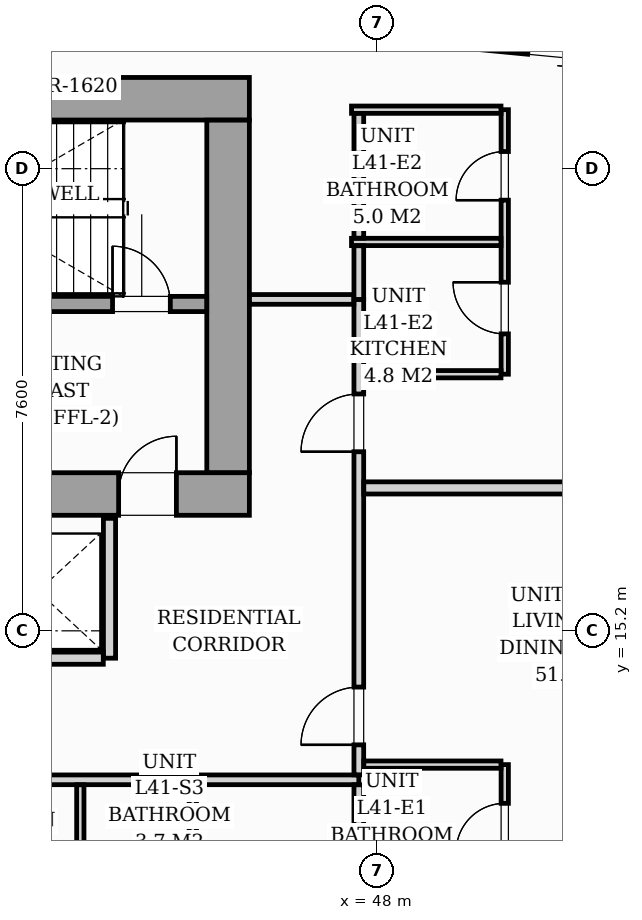
"""IFC4 building model, lengths in metres.
Left out: names, types, materials, properties, quantities, classifications, styles, units other than length and angle.
Written with IfcOpenShell. Run it as: python <this file> out.ifc"""

import sys

from ifc_helpers import new_model, si_unit, direction, frame, frame_2d, origin, origin_2d, place, context, subcontext, project, spatial, rectangle, i_section, extrude, source, transform, mapped, element, fill, save


model = new_model("IFC4")
c1 = context("Model", 3, precision=1e-05, world=origin(), true_north=direction((0.0, 1.0)))
c2 = subcontext(c1, "Body", "Model", "MODEL_VIEW")
j1 = project(units=[si_unit("LENGTHUNIT", "METRE"), si_unit("PLANEANGLEUNIT", "RADIAN")], contexts=[c1])
p1 = place(None, origin())
s1 = spatial("IfcSite", under=j1, at=p1, CompositionType="ELEMENT")
p2 = place(p1, origin())
s2 = spatial("IfcBuilding", under=s1, at=p2, CompositionType="ELEMENT")
p3 = place(p2, frame((0.0, 0.0, 143.8)))
s3 = spatial("IfcBuildingStorey", under=s2, at=p3, CompositionType="ELEMENT", Elevation=143.8)
m1 = source(origin(), c2, "Body", "SweptSolid", [
    extrude(i_section(OverallWidth=0.421, OverallDepth=0.465, WebThickness=0.045, FlangeThickness=0.073, FilletRadius=0.018, at=origin_2d()), origin(), (0.0, 0.0, 1.0), 3.196),
])
for number, where, z_axis, x_axis in (
    (1, (45.6, 17.4, 0.002), (0.0, 0.0, 1.0), (1.0, 0.0, 0.0)),
    (2, (45.6, 24.0, 0.002), (0.0, 0.0, 1.0), (1.0, 0.0, 0.0)),
):
    element("IfcColumn", number, at=place(p3, frame(where, z_axis=z_axis, x_axis=x_axis)), inside=s3, PredefinedType="PILASTER", context=c2, shape_type="MappedRepresentation", body=[
        mapped(m1, transform((0.0, 0.0, 0.0), scale=1.0)),
    ])
p4 = place(p3, frame((40.983, 25.727, 0.0), z_axis=(0.0, 0.0, 1.0), x_axis=(0.995395844771, -0.095849424686, 0.0)))
e3 = element("IfcWall", 3, at=p4, inside=s3, PredefinedType="STANDARD", context=c2, shape_type="SweptSolid", body=[
    extrude(rectangle(XDim=17.01, YDim=0.26, at=frame_2d((8.505, 0.0))), origin(), (0.0, 0.0, 1.0), 2.94),
])
p5 = place(p4, frame((9.55, 0.0, 0.0)))
e4 = element("IfcOpeningElement", 4, at=p5, cuts=e3, PredefinedType="OPENING", context=c2, shape_type="SweptSolid", body=[
    extrude(rectangle(XDim=1.8, YDim=2.06, at=frame_2d((0.9, 1.03))), frame((0.0, 0.14, 0.0), z_axis=(0.0, -1.0, 0.0), x_axis=(1.0, 0.0, 0.0)), (0.0, 0.0, 1.0), 0.28),
])
p6 = place(p4, frame((0.7, 0.0, 0.65)))
e5 = element("IfcOpeningElement", 5, at=p6, cuts=e3, PredefinedType="OPENING", context=c2, shape_type="SweptSolid", body=[
    extrude(rectangle(XDim=1.6, YDim=1.5, at=frame_2d((0.8, 0.75))), frame((0.0, 0.14, 0.0), z_axis=(0.0, -1.0, 0.0), x_axis=(1.0, 0.0, 0.0)), (0.0, 0.0, 1.0), 0.28),
])
p7 = place(p3, frame((26.1, 17.45, 0.0), z_axis=(0.0, 0.0, 1.0), x_axis=(1.0, 0.0, 0.0)))
e6 = element("IfcWall", 6, at=p7, inside=s3, PredefinedType="SHEAR", context=c2, shape_type="SweptSolid", body=[
    extrude(rectangle(XDim=19.8, YDim=0.7, at=frame_2d((9.9, 0.0))), origin(), (0.0, 0.0, 1.0), 3.2),
])
p8 = place(p7, frame((1.05, 0.0, 0.0)))
e7 = element("IfcOpeningElement", 7, at=p8, cuts=e6, PredefinedType="OPENING", context=c2, shape_type="SweptSolid", body=[
    extrude(rectangle(XDim=0.95, YDim=2.06, at=frame_2d((0.475, 1.03))), frame((0.0, 0.36, 0.0), z_axis=(0.0, -1.0, 0.0), x_axis=(1.0, 0.0, 0.0)), (0.0, 0.0, 1.0), 0.72),
])
p9 = place(p7, frame((9.48, 0.0, 0.0)))
e8 = element("IfcOpeningElement", 8, at=p9, cuts=e6, PredefinedType="OPENING", context=c2, shape_type="SweptSolid", body=[
    extrude(rectangle(XDim=0.85, YDim=2.0, at=frame_2d((0.425, 1.0))), frame((0.0, 0.36, 0.0), z_axis=(0.0, -1.0, 0.0), x_axis=(1.0, 0.0, 0.0)), (0.0, 0.0, 1.0), 0.72),
])
p10 = place(p7, frame((17.65, 0.0, 0.0)))
e9 = element("IfcOpeningElement", 9, at=p10, cuts=e6, PredefinedType="OPENING", context=c2, shape_type="SweptSolid", body=[
    extrude(rectangle(XDim=0.95, YDim=2.06, at=frame_2d((0.475, 1.03))), frame((0.0, 0.36, 0.0), z_axis=(0.0, -1.0, 0.0), x_axis=(1.0, 0.0, 0.0)), (0.0, 0.0, 1.0), 0.72),
])
p11 = place(p3, frame((26.1, 23.95, 0.0), z_axis=(0.0, 0.0, 1.0), x_axis=(1.0, 0.0, 0.0)))
e10 = element("IfcWall", 10, at=p11, inside=s3, PredefinedType="SHEAR", context=c2, shape_type="SweptSolid", body=[
    extrude(rectangle(XDim=19.8, YDim=0.7, at=frame_2d((9.9, 0.0))), origin(), (0.0, 0.0, 1.0), 3.2),
])
p12 = place(p3, frame((45.55, 17.802, 0.0), z_axis=(0.0, 0.0, 1.0), x_axis=(0.0, 1.0, 0.0)))
e11 = element("IfcWall", 11, at=p12, inside=s3, PredefinedType="SHEAR", context=c2, shape_type="SweptSolid", body=[
    extrude(rectangle(XDim=5.796, YDim=0.7, at=frame_2d((2.898, 0.0))), origin(), (0.0, 0.0, 1.0), 3.2),
])
p13 = place(p3, frame((37.05, 20.575, 0.0), z_axis=(0.0, 0.0, 1.0), x_axis=(1.0, 0.0, 0.0)))
e12 = element("IfcWall", 12, at=p13, inside=s3, PredefinedType="SOLIDWALL", context=c2, shape_type="SweptSolid", body=[
    extrude(rectangle(XDim=8.148, YDim=0.25, at=frame_2d((4.074, 0.0))), origin(), (0.0, 0.0, 1.0), 3.2),
])
p14 = place(p13, frame((6.6, 0.0, 0.0)))
e13 = element("IfcOpeningElement", 13, at=p14, cuts=e12, PredefinedType="OPENING", context=c2, shape_type="SweptSolid", body=[
    extrude(rectangle(XDim=0.95, YDim=2.06, at=frame_2d((0.475, 1.03))), frame((0.0, 0.135, 0.0), z_axis=(0.0, -1.0, 0.0), x_axis=(1.0, 0.0, 0.0)), (0.0, 0.0, 1.0), 0.27),
])
p15 = place(p3, frame((43.6, 14.75, 0.0), z_axis=(0.0, 0.0, 1.0), x_axis=(0.0, 1.0, 0.0)))
e14 = element("IfcWall", 14, at=p15, inside=s3, PredefinedType="PARTITIONING", context=c2, shape_type="SweptSolid", body=[
    extrude(rectangle(XDim=2.3, YDim=0.2, at=frame_2d((1.15, 0.0))), origin(), (0.0, 0.0, 1.0), 2.94),
])
p16 = place(p3, frame((41.352, 14.75, 0.0), z_axis=(0.0, 0.0, 1.0), x_axis=(1.0, 0.0, 0.0)))
e15 = element("IfcWall", 15, at=p16, inside=s3, PredefinedType="PARTITIONING", context=c2, shape_type="SweptSolid", body=[
    extrude(rectangle(XDim=2.146, YDim=0.2, at=frame_2d((1.073, 0.0))), origin(), (0.0, 0.0, 1.0), 2.94),
])
p17 = place(p3, frame((22.05, 12.75, 0.0), z_axis=(0.0, 0.0, 1.0), x_axis=(1.0, 0.0, 0.0)))
e16 = element("IfcWall", 16, at=p17, inside=s3, PredefinedType="PARTITIONING", context=c2, shape_type="SweptSolid", body=[
    extrude(rectangle(XDim=25.65, YDim=0.16, at=frame_2d((12.825, 0.0))), origin(), (0.0, 0.0, 1.0), 2.94),
])
p18 = place(p17, frame((1.312, 0.0, 0.0)))
e17 = element("IfcOpeningElement", 17, at=p18, cuts=e16, PredefinedType="OPENING", context=c2, shape_type="SweptSolid", body=[
    extrude(rectangle(XDim=0.95, YDim=2.06, at=frame_2d((0.475, 1.03))), frame((0.0, 0.09, 0.0), z_axis=(0.0, -1.0, 0.0), x_axis=(1.0, 0.0, 0.0)), (0.0, 0.0, 1.0), 0.18),
])
p19 = place(p17, frame((8.281, 0.0, 0.0)))
e18 = element("IfcOpeningElement", 18, at=p19, cuts=e16, PredefinedType="OPENING", context=c2, shape_type="SweptSolid", body=[
    extrude(rectangle(XDim=0.95, YDim=2.06, at=frame_2d((0.475, 1.03))), frame((0.0, 0.09, 0.0), z_axis=(0.0, -1.0, 0.0), x_axis=(1.0, 0.0, 0.0)), (0.0, 0.0, 1.0), 0.18),
])
p20 = place(p17, frame((17.268, 0.0, 0.0)))
e19 = element("IfcOpeningElement", 19, at=p20, cuts=e16, PredefinedType="OPENING", context=c2, shape_type="SweptSolid", body=[
    extrude(rectangle(XDim=0.95, YDim=2.06, at=frame_2d((0.475, 1.03))), frame((0.0, 0.09, 0.0), z_axis=(0.0, -1.0, 0.0), x_axis=(1.0, 0.0, 0.0)), (0.0, 0.0, 1.0), 0.18),
])
p21 = place(p3, frame((47.7, 5.783, 0.0), z_axis=(0.0, 0.0, 1.0), x_axis=(0.0, 1.0, 0.0)))
e20 = element("IfcWall", 20, at=p21, inside=s3, PredefinedType="PARTITIONING", context=c2, shape_type="SweptSolid", body=[
    extrude(rectangle(XDim=6.885, YDim=0.16, at=frame_2d((3.442, 0.0))), origin(), (0.0, 0.0, 1.0), 2.94),
])
p22 = place(p3, frame((47.7, 12.832, 0.0), z_axis=(0.0, 0.0, 1.0), x_axis=(0.0, 1.0, 0.0)))
e21 = element("IfcWall", 21, at=p22, inside=s3, PredefinedType="PARTITIONING", context=c2, shape_type="SweptSolid", body=[
    extrude(rectangle(XDim=7.818, YDim=0.16, at=frame_2d((3.909, 0.0))), origin(), (0.0, 0.0, 1.0), 2.94),
])
p23 = place(p22, frame((0.493, 0.0, 0.0)))
e22 = element("IfcOpeningElement", 22, at=p23, cuts=e21, PredefinedType="OPENING", context=c2, shape_type="SweptSolid", body=[
    extrude(rectangle(XDim=0.95, YDim=2.06, at=frame_2d((0.475, 1.03))), frame((0.0, 0.09, 0.0), z_axis=(0.0, -1.0, 0.0), x_axis=(1.0, 0.0, 0.0)), (0.0, 0.0, 1.0), 0.18),
])
p24 = place(p22, frame((5.313, 0.0, 0.0)))
e23 = element("IfcOpeningElement", 23, at=p24, cuts=e21, PredefinedType="OPENING", context=c2, shape_type="SweptSolid", body=[
    extrude(rectangle(XDim=0.95, YDim=2.06, at=frame_2d((0.475, 1.03))), frame((0.0, 0.09, 0.0), z_axis=(0.0, -1.0, 0.0), x_axis=(1.0, 0.0, 0.0)), (0.0, 0.0, 1.0), 0.18),
])
p25 = place(p3, frame((45.902, 20.65, 0.0), z_axis=(0.0, 0.0, 1.0), x_axis=(1.0, 0.0, 0.0)))
e24 = element("IfcWall", 24, at=p25, inside=s3, PredefinedType="PARTITIONING", context=c2, shape_type="SweptSolid", body=[
    extrude(rectangle(XDim=1.716, YDim=0.16, at=frame_2d((0.858, 0.0))), origin(), (0.0, 0.0, 1.0), 2.94),
])
p26 = place(p3, frame((44.97, 6.046, 0.0), z_axis=(0.0, 0.0, 1.0), x_axis=(0.0, 1.0, 0.0)))
e25 = element("IfcWall", 25, at=p26, inside=s3, PredefinedType="PARTITIONING", context=c2, shape_type="SweptSolid", body=[
    extrude(rectangle(XDim=6.622, YDim=0.12, at=frame_2d((3.311, 0.0))), origin(), (0.0, 0.0, 1.0), 2.94),
])
p27 = place(p26, frame((3.354, 0.0, 0.0)))
e26 = element("IfcOpeningElement", 26, at=p27, cuts=e25, PredefinedType="OPENING", context=c2, shape_type="SweptSolid", body=[
    extrude(rectangle(XDim=0.9, YDim=2.05, at=frame_2d((0.45, 1.025))), frame((0.0, 0.07, 0.0), z_axis=(0.0, -1.0, 0.0), x_axis=(1.0, 0.0, 0.0)), (0.0, 0.0, 1.0), 0.14),
])
p28 = place(p3, frame((43.12, 10.562, 0.0), z_axis=(0.0, 0.0, 1.0), x_axis=(0.0, 1.0, 0.0)))
e27 = element("IfcWall", 27, at=p28, inside=s3, PredefinedType="PARTITIONING", context=c2, shape_type="SweptSolid", body=[
    extrude(rectangle(XDim=2.106, YDim=0.12, at=frame_2d((1.053, 0.0))), origin(), (0.0, 0.0, 1.0), 2.94),
])
p29 = place(p3, frame((47.782, 17.55, 0.0), z_axis=(0.0, 0.0, 1.0), x_axis=(1.0, 0.0, 0.0)))
e28 = element("IfcWall", 28, at=p29, inside=s3, PredefinedType="PARTITIONING", context=c2, shape_type="SweptSolid", body=[
    extrude(rectangle(XDim=11.934, YDim=0.2, at=frame_2d((5.967, 0.0))), origin(), (0.0, 0.0, 1.0), 2.94),
])
p30 = place(p3, frame((50.1, 8.85, 0.0), z_axis=(0.0, 0.0, 1.0), x_axis=(0.0, 1.0, 0.0)))
e29 = element("IfcWall", 29, at=p30, inside=s3, PredefinedType="PARTITIONING", context=c2, shape_type="SweptSolid", body=[
    extrude(rectangle(XDim=4.15, YDim=0.12, at=frame_2d((2.075, 0.0))), origin(), (0.0, 0.0, 1.0), 2.94),
])
p31 = place(p30, frame((0.612, 0.0, 0.0)))
e30 = element("IfcOpeningElement", 30, at=p31, cuts=e29, PredefinedType="OPENING", context=c2, shape_type="SweptSolid", body=[
    extrude(rectangle(XDim=0.85, YDim=2.05, at=frame_2d((0.425, 1.025))), frame((0.0, 0.07, 0.0), z_axis=(0.0, -1.0, 0.0), x_axis=(1.0, 0.0, 0.0)), (0.0, 0.0, 1.0), 0.14),
])
p32 = place(p30, frame((2.713, 0.0, 0.0)))
e31 = element("IfcOpeningElement", 31, at=p32, cuts=e29, PredefinedType="OPENING", context=c2, shape_type="SweptSolid", body=[
    extrude(rectangle(XDim=0.8, YDim=2.02, at=frame_2d((0.4, 1.01))), frame((0.0, 0.07, 0.0), z_axis=(0.0, -1.0, 0.0), x_axis=(1.0, 0.0, 0.0)), (0.0, 0.0, 1.0), 0.14),
])
p33 = place(p3, frame((47.782, 13.0, 0.0), z_axis=(0.0, 0.0, 1.0), x_axis=(1.0, 0.0, 0.0)))
e32 = element("IfcWall", 32, at=p33, inside=s3, PredefinedType="PARTITIONING", context=c2, shape_type="SweptSolid", body=[
    extrude(rectangle(XDim=2.256, YDim=0.12, at=frame_2d((1.128, 0.0))), origin(), (0.0, 0.0, 1.0), 2.94),
])
p34 = place(p3, frame((50.1, 19.42, 0.0), z_axis=(0.0, 0.0, 1.0), x_axis=(0.0, 1.0, 0.0)))
e33 = element("IfcWall", 33, at=p34, inside=s3, PredefinedType="PARTITIONING", context=c2, shape_type="SweptSolid", body=[
    extrude(rectangle(XDim=4.35, YDim=0.12, at=frame_2d((2.175, 0.0))), origin(), (0.0, 0.0, 1.0), 2.94),
])
p35 = place(p34, frame((0.663, 0.0, 0.0)))
e34 = element("IfcOpeningElement", 34, at=p35, cuts=e33, PredefinedType="OPENING", context=c2, shape_type="SweptSolid", body=[
    extrude(rectangle(XDim=0.85, YDim=2.05, at=frame_2d((0.425, 1.025))), frame((0.0, 0.07, 0.0), z_axis=(0.0, -1.0, 0.0), x_axis=(1.0, 0.0, 0.0)), (0.0, 0.0, 1.0), 0.14),
])
p36 = place(p34, frame((2.862, 0.0, 0.0)))
e35 = element("IfcOpeningElement", 35, at=p36, cuts=e33, PredefinedType="OPENING", context=c2, shape_type="SweptSolid", body=[
    extrude(rectangle(XDim=0.8, YDim=2.02, at=frame_2d((0.4, 1.01))), frame((0.0, 0.07, 0.0), z_axis=(0.0, -1.0, 0.0), x_axis=(1.0, 0.0, 0.0)), (0.0, 0.0, 1.0), 0.14),
])
p37 = place(p3, frame((47.58, 21.595, 0.0), z_axis=(0.0, 0.0, 1.0), x_axis=(1.0, 0.0, 0.0)))
e36 = element("IfcWall", 36, at=p37, inside=s3, PredefinedType="PARTITIONING", context=c2, shape_type="SweptSolid", body=[
    extrude(rectangle(XDim=2.458, YDim=0.12, at=frame_2d((1.229, 0.0))), origin(), (0.0, 0.0, 1.0), 2.94),
])
p38 = place(p3, frame((47.782, 19.42, 0.0), z_axis=(0.0, 0.0, 1.0), x_axis=(1.0, 0.0, 0.0)))
e37 = element("IfcWall", 37, at=p38, inside=s3, PredefinedType="PARTITIONING", context=c2, shape_type="SweptSolid", body=[
    extrude(rectangle(XDim=2.256, YDim=0.12, at=frame_2d((1.128, 0.0))), origin(), (0.0, 0.0, 1.0), 2.94),
])
p39 = place(p3, frame((47.58, 23.77, 0.0), z_axis=(0.0, 0.0, 1.0), x_axis=(1.0, 0.0, 0.0)))
e38 = element("IfcWall", 38, at=p39, inside=s3, PredefinedType="PARTITIONING", context=c2, shape_type="SweptSolid", body=[
    extrude(rectangle(XDim=2.458, YDim=0.12, at=frame_2d((1.229, 0.0))), origin(), (0.0, 0.0, 1.0), 2.216),
])
p40 = place(p3, frame((47.7, 20.65, 0.0), z_axis=(0.0, 0.0, 1.0), x_axis=(0.0, 1.0, 0.0)))
e39 = element("IfcWall", 39, at=p40, inside=s3, PredefinedType="PARTITIONING", context=c2, shape_type="SweptSolid", body=[
    extrude(rectangle(XDim=0.883, YDim=0.16, at=frame_2d((0.441, 0.0))), origin(), (0.0, 0.0, 1.0), 2.94),
])
p41 = place(p3, frame((47.7, 21.657, 0.0), z_axis=(0.0, 0.0, 1.0), x_axis=(0.0, 1.0, 0.0)))
e40 = element("IfcWall", 40, at=p41, inside=s3, PredefinedType="PARTITIONING", context=c2, shape_type="SweptSolid", body=[
    extrude(rectangle(XDim=2.051, YDim=0.16, at=frame_2d((1.025, 0.0))), origin(), (0.0, 0.0, 1.0), 2.94),
])
m2 = source(origin(), c2, "Body", "SweptSolid", [
    extrude(rectangle(XDim=1.8, YDim=2.06, at=frame_2d((0.9, 1.03))), frame((0.0, 0.025, 0.0), z_axis=(0.0, -1.0, 0.0), x_axis=(1.0, 0.0, 0.0)), (0.0, 0.0, 1.0), 0.05),
])
p42 = place(p5, origin())
e41 = element("IfcDoor", 41, at=p42, inside=s3, OperationType="SLIDING_TO_RIGHT", PredefinedType="DOOR", context=c2, shape_type="MappedRepresentation", body=[
    mapped(m2, transform((0.0, 0.0, 0.0), scale=1.0)),
])
fill(e4, e41)
m3 = source(origin(), c2, "Body", "SweptSolid", [
    extrude(rectangle(XDim=0.95, YDim=2.06, at=frame_2d((0.475, 1.03))), frame((0.0, 0.025, 0.0), z_axis=(0.0, -1.0, 0.0), x_axis=(1.0, 0.0, 0.0)), (0.0, 0.0, 1.0), 0.05),
])
p43 = place(p10, origin())
e42 = element("IfcDoor", 42, at=p43, inside=s3, OperationType="SINGLE_SWING_RIGHT", PredefinedType="DOOR", context=c2, shape_type="MappedRepresentation", body=[
    mapped(m3, transform((0.0, 0.0, 0.0), scale=1.0)),
])
fill(e9, e42)
p44 = place(p14, origin())
e43 = element("IfcDoor", 43, at=p44, inside=s3, OperationType="SINGLE_SWING_LEFT", PredefinedType="DOOR", context=c2, shape_type="MappedRepresentation", body=[
    mapped(m3, transform((0.0, 0.0, 0.0), scale=1.0)),
])
fill(e13, e43)
m4 = source(origin(), c2, "Body", "SweptSolid", [
    extrude(rectangle(XDim=0.95, YDim=2.06, at=frame_2d((0.475, 1.03))), frame((0.0, 0.025, 0.0), z_axis=(0.0, -1.0, 0.0), x_axis=(1.0, 0.0, 0.0)), (0.0, 0.0, 1.0), 0.05),
])
p45 = place(p23, origin())
e44 = element("IfcDoor", 44, at=p45, inside=s3, OperationType="SINGLE_SWING_LEFT", PredefinedType="DOOR", context=c2, shape_type="MappedRepresentation", body=[
    mapped(m4, transform((0.0, 0.0, 0.0), scale=1.0)),
])
fill(e22, e44)
m5 = source(origin(), c2, "Body", "SweptSolid", [
    extrude(rectangle(XDim=0.8, YDim=2.02, at=frame_2d((0.4, 1.01))), frame((0.0, 0.025, 0.0), z_axis=(0.0, -1.0, 0.0), x_axis=(1.0, 0.0, 0.0)), (0.0, 0.0, 1.0), 0.05),
])
p46 = place(p32, origin())
e45 = element("IfcDoor", 45, at=p46, inside=s3, OperationType="SINGLE_SWING_LEFT", PredefinedType="DOOR", context=c2, shape_type="MappedRepresentation", body=[
    mapped(m5, transform((0.0, 0.0, 0.0), scale=1.0)),
])
fill(e31, e45)
p47 = place(p24, origin())
e46 = element("IfcDoor", 46, at=p47, inside=s3, OperationType="SINGLE_SWING_LEFT", PredefinedType="DOOR", context=c2, shape_type="MappedRepresentation", body=[
    mapped(m4, transform((0.0, 0.0, 0.0), scale=1.0)),
])
fill(e23, e46)
m6 = source(origin(), c2, "Body", "SweptSolid", [
    extrude(rectangle(XDim=0.85, YDim=2.05, at=frame_2d((0.425, 1.025))), frame((0.0, 0.025, 0.0), z_axis=(0.0, -1.0, 0.0), x_axis=(1.0, 0.0, 0.0)), (0.0, 0.0, 1.0), 0.05),
])
p48 = place(p35, origin())
e47 = element("IfcDoor", 47, at=p48, inside=s3, OperationType="SINGLE_SWING_RIGHT", PredefinedType="DOOR", context=c2, shape_type="MappedRepresentation", body=[
    mapped(m6, transform((0.0, 0.0, 0.0), scale=1.0)),
])
fill(e34, e47)
p49 = place(p36, origin())
e48 = element("IfcDoor", 48, at=p49, inside=s3, OperationType="SINGLE_SWING_LEFT", PredefinedType="DOOR", context=c2, shape_type="MappedRepresentation", body=[
    mapped(m5, transform((0.0, 0.0, 0.0), scale=1.0)),
])
fill(e35, e48)
save(model, sys.argv[1])
